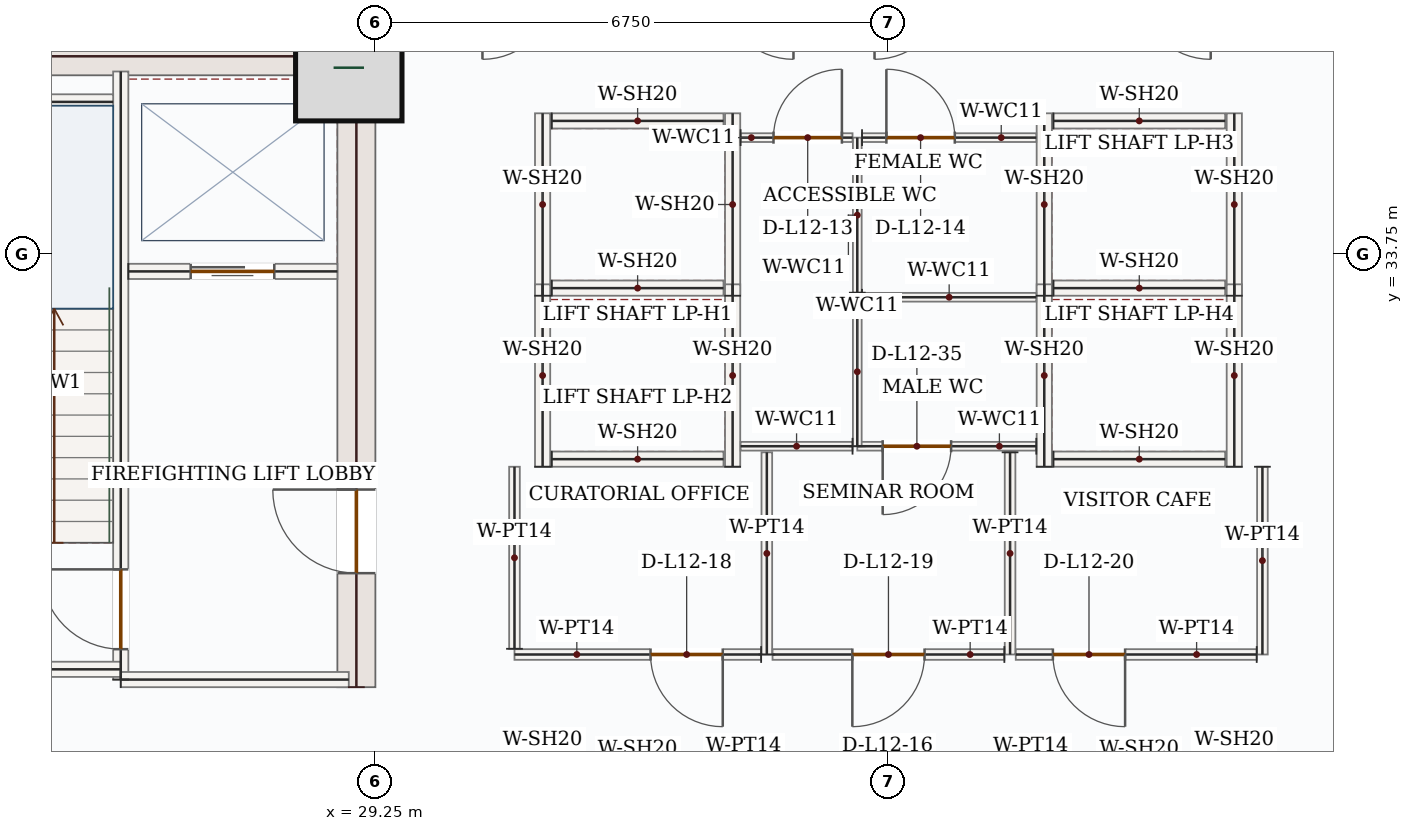
"""IFC4 building model, lengths in metres.
Left out: names, types, materials, properties, quantities, classifications, styles, units other than length and angle.
Written with IfcOpenShell. Run it as: python <this file> out.ifc"""

import sys

from ifc_helpers import new_model, si_unit, direction, frame, frame_2d, origin, origin_2d, place, context, subcontext, project, spatial, rectangle, extrude, source, transform, mapped, element, fill, save


model = new_model("IFC4")
c1 = context("Model", 3, precision=1e-05, world=origin(), true_north=direction((0.0, 1.0)))
c2 = subcontext(c1, "Body", "Model", "MODEL_VIEW")
j1 = project(units=[si_unit("LENGTHUNIT", "METRE"), si_unit("PLANEANGLEUNIT", "RADIAN")], contexts=[c1])
p1 = place(None, origin())
s1 = spatial("IfcSite", under=j1, at=p1, CompositionType="ELEMENT")
p2 = place(p1, origin())
s2 = spatial("IfcBuilding", under=s1, at=p2, CompositionType="ELEMENT")
p3 = place(p2, frame((0.0, 0.0, 58.5)))
s3 = spatial("IfcBuildingStorey", under=s2, at=p3, CompositionType="ELEMENT", Elevation=58.5)
p4 = place(p3, frame((29.0, 28.05, 0.0), z_axis=(0.0, 0.0, 1.0), x_axis=(0.0, 1.0, 0.0)))
e1 = element("IfcWall", 1, at=p4, inside=s3, PredefinedType="SHEAR", context=c2, shape_type="SweptSolid", body=[
    extrude(rectangle(XDim=8.55, YDim=0.5, at=frame_2d((4.275, 0.0))), origin(), (0.0, 0.0, 1.0), 3.95),
])
p5 = place(p4, frame((1.5, 0.0, 0.0)))
e2 = element("IfcOpeningElement", 2, at=p5, cuts=e1, PredefinedType="OPENING", context=c2, shape_type="SweptSolid", body=[
    extrude(rectangle(XDim=1.1, YDim=2.2, at=frame_2d((0.55, 1.1))), frame((0.0, 0.26, 0.0), z_axis=(0.0, -1.0, 0.0), x_axis=(1.0, 0.0, 0.0)), (0.0, 0.0, 1.0), 0.52),
])
m1 = source(origin(), c2, "Body", "SweptSolid", [
    extrude(rectangle(XDim=7.0, YDim=0.5, at=frame_2d((3.5, 0.0))), origin(), (0.0, 0.0, 1.0), 3.95),
])
p6 = place(p3, frame((21.75, 36.35, 0.0), z_axis=(0.0, 0.0, 1.0), x_axis=(1.0, 0.0, 0.0)))
e3 = element("IfcWall", 3, at=p6, inside=s3, PredefinedType="SHEAR", context=c2, shape_type="MappedRepresentation", body=[
    mapped(m1, transform((0.0, 0.0, 0.0), x_axis=(1.0, 0.0, 0.0), y_axis=(0.0, 1.0, 0.0), z_axis=(0.0, 0.0, 1.0), scale=1.0)),
])
m2 = source(origin(), c2, "Body", "SweptSolid", [
    extrude(rectangle(XDim=1.4, YDim=1.4, at=origin_2d()), origin(), (0.0, 0.0, 1.0), 4.2),
])
p7 = place(p3, frame((28.9, 36.2, 0.0), z_axis=(0.0, 0.0, 1.0), x_axis=(1.0, 0.0, 0.0)))
e4 = element("IfcColumn", 4, at=p7, inside=s3, PredefinedType="COLUMN", context=c2, shape_type="MappedRepresentation", body=[
    mapped(m2, transform((0.0, 0.0, 0.0), x_axis=(1.0, 0.0, 0.0), y_axis=(0.0, 1.0, 0.0), z_axis=(0.0, 0.0, 1.0), scale=1.0)),
])
p8 = place(p3, frame((25.9, 28.15, 0.0), z_axis=(0.0, 0.0, 1.0), x_axis=(0.0, 1.0, 0.0)))
e5 = element("IfcWall", 5, at=p8, inside=s3, PredefinedType="SOLIDWALL", context=c2, shape_type="SweptSolid", body=[
    extrude(rectangle(XDim=8.0, YDim=0.2, at=frame_2d((4.0, 0.0))), origin(), (0.0, 0.0, 1.0), 3.95),
])
p9 = place(p8, frame((0.4, 0.0, 0.0)))
e6 = element("IfcOpeningElement", 6, at=p9, cuts=e5, PredefinedType="OPENING", context=c2, shape_type="SweptSolid", body=[
    extrude(rectangle(XDim=1.05, YDim=2.15, at=frame_2d((0.525, 1.075))), frame((0.0, 0.11, 0.0), z_axis=(0.0, -1.0, 0.0), x_axis=(1.0, 0.0, 0.0)), (0.0, 0.0, 1.0), 0.22),
])
m3 = source(origin(), c2, "Body", "SweptSolid", [
    extrude(rectangle(XDim=4.25, YDim=0.2, at=frame_2d((2.125, 0.0))), origin(), (0.0, 0.0, 1.0), 3.95),
])
p10 = place(p3, frame((21.65, 28.285, 0.0), z_axis=(0.0, 0.0, 1.0), x_axis=(1.0, 0.0, 0.0)))
e7 = element("IfcWall", 7, at=p10, inside=s3, PredefinedType="SOLIDWALL", context=c2, shape_type="MappedRepresentation", body=[
    mapped(m3, transform((0.0, 0.0, 0.0), x_axis=(1.0, 0.0, 0.0), y_axis=(0.0, 1.0, 0.0), z_axis=(0.0, 0.0, 1.0), scale=1.0)),
])
m4 = source(origin(), c2, "Body", "SweptSolid", [
    extrude(rectangle(XDim=3.0, YDim=0.2, at=frame_2d((1.5, 0.0))), origin(), (0.0, 0.0, 1.0), 3.95),
])
p11 = place(p3, frame((25.9, 28.15, 0.0), z_axis=(0.0, 0.0, 1.0), x_axis=(1.0, 0.0, 0.0)))
e8 = element("IfcWall", 8, at=p11, inside=s3, PredefinedType="SOLIDWALL", context=c2, shape_type="MappedRepresentation", body=[
    mapped(m4, transform((0.0, 0.0, 0.0), x_axis=(1.0, 0.0, 0.0), y_axis=(0.0, 1.0, 0.0), z_axis=(0.0, 0.0, 1.0), scale=1.0)),
])
m5 = source(origin(), c2, "Body", "SweptSolid", [
    extrude(rectangle(XDim=3.25, YDim=0.2, at=frame_2d((1.625, 0.0))), origin(), (0.0, 0.0, 1.0), 3.95),
])
p12 = place(p3, frame((22.55, 35.75, 0.0), z_axis=(0.0, 0.0, 1.0), x_axis=(1.0, 0.0, 0.0)))
e9 = element("IfcWall", 9, at=p12, inside=s3, PredefinedType="SOLIDWALL", context=c2, shape_type="MappedRepresentation", body=[
    mapped(m5, transform((0.0, 0.0, 0.0), x_axis=(1.0, 0.0, 0.0), y_axis=(0.0, 1.0, 0.0), z_axis=(0.0, 0.0, 1.0), scale=1.0)),
])
p13 = place(p3, frame((26.0, 33.52, 0.0), z_axis=(0.0, 0.0, 1.0), x_axis=(1.0, 0.0, 0.0)))
e10 = element("IfcWall", 10, at=p13, inside=s3, PredefinedType="SOLIDWALL", context=c2, shape_type="SweptSolid", body=[
    extrude(rectangle(XDim=2.75, YDim=0.2, at=frame_2d((1.375, 0.0))), origin(), (0.0, 0.0, 1.0), 3.95),
])
p14 = place(p13, frame((0.82, 0.0, 0.0)))
e11 = element("IfcOpeningElement", 11, at=p14, cuts=e10, PredefinedType="OPENING", context=c2, shape_type="SweptSolid", body=[
    extrude(rectangle(XDim=1.1, YDim=2.15, at=frame_2d((0.55, 1.075))), frame((0.0, 0.11, 0.0), z_axis=(0.0, -1.0, 0.0), x_axis=(1.0, 0.0, 0.0)), (0.0, 0.0, 1.0), 0.22),
])
m6 = source(origin(), c2, "Body", "SweptSolid", [
    extrude(rectangle(XDim=2.4, YDim=0.2, at=frame_2d((1.2, 0.0))), origin(), (0.0, 0.0, 1.0), 3.95),
])
for number, where, z_axis, x_axis in (
    (12, (31.45, 33.2, 0.0), (0.0, 0.0, 1.0), (0.0, 1.0, 0.0)),
    (13, (33.95, 33.2, 0.0), (0.0, 0.0, 1.0), (0.0, 1.0, 0.0)),
):
    element("IfcWall", number, at=place(p3, frame(where, z_axis=z_axis, x_axis=x_axis)), inside=s3, PredefinedType="SOLIDWALL", context=c2, shape_type="MappedRepresentation", body=[
        mapped(m6, transform((0.0, 0.0, 0.0), x_axis=(1.0, 0.0, 0.0), y_axis=(0.0, 1.0, 0.0), z_axis=(0.0, 0.0, 1.0), scale=1.0)),
    ])
m7 = source(origin(), c2, "Body", "SweptSolid", [
    extrude(rectangle(XDim=2.26, YDim=0.2, at=frame_2d((1.13, 0.0))), origin(), (0.0, 0.0, 1.0), 3.95),
])
for number, where, z_axis, x_axis in (
    (14, (31.57, 33.3, 0.0), (0.0, 0.0, 1.0), (1.0, 0.0, 0.0)),
    (15, (31.57, 35.5, 0.0), (0.0, 0.0, 1.0), (1.0, 0.0, 0.0)),
):
    element("IfcWall", number, at=place(p3, frame(where, z_axis=z_axis, x_axis=x_axis)), inside=s3, PredefinedType="SOLIDWALL", context=c2, shape_type="MappedRepresentation", body=[
        mapped(m7, transform((0.0, 0.0, 0.0), x_axis=(1.0, 0.0, 0.0), y_axis=(0.0, 1.0, 0.0), z_axis=(0.0, 0.0, 1.0), scale=1.0)),
    ])
for number, where, z_axis, x_axis in (
    (16, (31.45, 30.95, 0.0), (0.0, 0.0, 1.0), (0.0, 1.0, 0.0)),
    (17, (33.95, 30.95, 0.0), (0.0, 0.0, 1.0), (0.0, 1.0, 0.0)),
):
    element("IfcWall", number, at=place(p3, frame(where, z_axis=z_axis, x_axis=x_axis)), inside=s3, PredefinedType="SOLIDWALL", context=c2, shape_type="MappedRepresentation", body=[
        mapped(m6, transform((0.0, 0.0, 0.0), x_axis=(1.0, 0.0, 0.0), y_axis=(0.0, 1.0, 0.0), z_axis=(0.0, 0.0, 1.0), scale=1.0)),
    ])
p15 = place(p3, frame((31.57, 31.05, 0.0), z_axis=(0.0, 0.0, 1.0), x_axis=(1.0, 0.0, 0.0)))
e18 = element("IfcWall", 18, at=p15, inside=s3, PredefinedType="SOLIDWALL", context=c2, shape_type="MappedRepresentation", body=[
    mapped(m7, transform((0.0, 0.0, 0.0), x_axis=(1.0, 0.0, 0.0), y_axis=(0.0, 1.0, 0.0), z_axis=(0.0, 0.0, 1.0), scale=1.0)),
])
for number, where, z_axis, x_axis in (
    (19, (38.05, 33.2, 0.0), (0.0, 0.0, 1.0), (0.0, 1.0, 0.0)),
    (20, (40.55, 33.2, 0.0), (0.0, 0.0, 1.0), (0.0, 1.0, 0.0)),
):
    element("IfcWall", number, at=place(p3, frame(where, z_axis=z_axis, x_axis=x_axis)), inside=s3, PredefinedType="SOLIDWALL", context=c2, shape_type="MappedRepresentation", body=[
        mapped(m6, transform((0.0, 0.0, 0.0), x_axis=(1.0, 0.0, 0.0), y_axis=(0.0, 1.0, 0.0), z_axis=(0.0, 0.0, 1.0), scale=1.0)),
    ])
for number, where, z_axis, x_axis in (
    (21, (38.17, 33.3, 0.0), (0.0, 0.0, 1.0), (1.0, 0.0, 0.0)),
    (22, (38.17, 35.5, 0.0), (0.0, 0.0, 1.0), (1.0, 0.0, 0.0)),
):
    element("IfcWall", number, at=place(p3, frame(where, z_axis=z_axis, x_axis=x_axis)), inside=s3, PredefinedType="SOLIDWALL", context=c2, shape_type="MappedRepresentation", body=[
        mapped(m7, transform((0.0, 0.0, 0.0), x_axis=(1.0, 0.0, 0.0), y_axis=(0.0, 1.0, 0.0), z_axis=(0.0, 0.0, 1.0), scale=1.0)),
    ])
for number, where, z_axis, x_axis in (
    (23, (38.05, 30.95, 0.0), (0.0, 0.0, 1.0), (0.0, 1.0, 0.0)),
    (24, (40.55, 30.95, 0.0), (0.0, 0.0, 1.0), (0.0, 1.0, 0.0)),
):
    element("IfcWall", number, at=place(p3, frame(where, z_axis=z_axis, x_axis=x_axis)), inside=s3, PredefinedType="SOLIDWALL", context=c2, shape_type="MappedRepresentation", body=[
        mapped(m6, transform((0.0, 0.0, 0.0), x_axis=(1.0, 0.0, 0.0), y_axis=(0.0, 1.0, 0.0), z_axis=(0.0, 0.0, 1.0), scale=1.0)),
    ])
p16 = place(p3, frame((38.17, 31.05, 0.0), z_axis=(0.0, 0.0, 1.0), x_axis=(1.0, 0.0, 0.0)))
e25 = element("IfcWall", 25, at=p16, inside=s3, PredefinedType="SOLIDWALL", context=c2, shape_type="MappedRepresentation", body=[
    mapped(m7, transform((0.0, 0.0, 0.0), x_axis=(1.0, 0.0, 0.0), y_axis=(0.0, 1.0, 0.0), z_axis=(0.0, 0.0, 1.0), scale=1.0)),
])
p17 = place(p3, frame((37.945, 31.22, 0.0), z_axis=(0.0, 0.0, 1.0), x_axis=(-1.0, 0.0, 0.0)))
e26 = element("IfcWall", 26, at=p17, inside=s3, PredefinedType="PARTITIONING", context=c2, shape_type="SweptSolid", body=[
    extrude(rectangle(XDim=2.355, YDim=0.115, at=frame_2d((1.177, 0.0))), origin(), (0.0, 0.0, 1.0), 3.95),
])
p18 = place(p17, frame((1.121, 0.0, 0.0)))
e27 = element("IfcOpeningElement", 27, at=p18, cuts=e26, PredefinedType="OPENING", context=c2, shape_type="SweptSolid", body=[
    extrude(rectangle(XDim=0.9, YDim=2.1, at=frame_2d((0.45, 1.05))), frame((0.0, 0.067, 0.0), z_axis=(0.0, -1.0, 0.0), x_axis=(1.0, 0.0, 0.0)), (0.0, 0.0, 1.0), 0.135),
])
m8 = source(origin(), c2, "Body", "SweptSolid", [
    extrude(rectangle(XDim=1.96, YDim=0.115, at=frame_2d((0.98, 0.0))), origin(), (0.0, 0.0, 1.0), 3.95),
])
p19 = place(p3, frame((35.59, 31.22, 0.0), z_axis=(0.0, 0.0, 1.0), x_axis=(0.0, 1.0, 0.0)))
e28 = element("IfcWall", 28, at=p19, inside=s3, PredefinedType="PARTITIONING", context=c2, shape_type="MappedRepresentation", body=[
    mapped(m8, transform((0.0, 0.0, 0.0), x_axis=(1.0, 0.0, 0.0), y_axis=(0.0, 1.0, 0.0), z_axis=(0.0, 0.0, 1.0), scale=1.0)),
])
m9 = source(origin(), c2, "Body", "SweptSolid", [
    extrude(rectangle(XDim=2.292, YDim=0.115, at=frame_2d((1.146, 0.0))), origin(), (0.0, 0.0, 1.0), 3.95),
])
p20 = place(p3, frame((35.653, 33.18, 0.0), z_axis=(0.0, 0.0, 1.0), x_axis=(1.0, 0.0, 0.0)))
e29 = element("IfcWall", 29, at=p20, inside=s3, PredefinedType="PARTITIONING", context=c2, shape_type="MappedRepresentation", body=[
    mapped(m9, transform((0.0, 0.0, 0.0), x_axis=(1.0, 0.0, 0.0), y_axis=(0.0, 1.0, 0.0), z_axis=(0.0, 0.0, 1.0), scale=1.0)),
])
m10 = source(origin(), c2, "Body", "SweptSolid", [
    extrude(rectangle(XDim=2.04, YDim=0.115, at=frame_2d((1.02, 0.0))), origin(), (0.0, 0.0, 1.0), 3.95),
])
p21 = place(p3, frame((35.59, 33.24, 0.0), z_axis=(0.0, 0.0, 1.0), x_axis=(0.0, 1.0, 0.0)))
e30 = element("IfcWall", 30, at=p21, inside=s3, PredefinedType="PARTITIONING", context=c2, shape_type="MappedRepresentation", body=[
    mapped(m10, transform((0.0, 0.0, 0.0), x_axis=(1.0, 0.0, 0.0), y_axis=(0.0, 1.0, 0.0), z_axis=(0.0, 0.0, 1.0), scale=1.0)),
])
p22 = place(p3, frame((35.653, 35.28, 0.0), z_axis=(0.0, 0.0, 1.0), x_axis=(1.0, 0.0, 0.0)))
e31 = element("IfcWall", 31, at=p22, inside=s3, PredefinedType="PARTITIONING", context=c2, shape_type="SweptSolid", body=[
    extrude(rectangle(XDim=2.292, YDim=0.115, at=frame_2d((1.146, 0.0))), origin(), (0.0, 0.0, 1.0), 3.95),
])
p23 = place(p22, frame((0.32, 0.0, 0.0)))
e32 = element("IfcOpeningElement", 32, at=p23, cuts=e31, PredefinedType="OPENING", context=c2, shape_type="SweptSolid", body=[
    extrude(rectangle(XDim=0.9, YDim=2.1, at=frame_2d((0.45, 1.05))), frame((0.0, 0.067, 0.0), z_axis=(0.0, -1.0, 0.0), x_axis=(1.0, 0.0, 0.0)), (0.0, 0.0, 1.0), 0.135),
])
m11 = source(origin(), c2, "Body", "SweptSolid", [
    extrude(rectangle(XDim=1.473, YDim=0.115, at=frame_2d((0.736, 0.0))), origin(), (0.0, 0.0, 1.0), 3.95),
])
p24 = place(p3, frame((35.528, 31.22, 0.0), z_axis=(0.0, 0.0, 1.0), x_axis=(-1.0, 0.0, 0.0)))
e33 = element("IfcWall", 33, at=p24, inside=s3, PredefinedType="PARTITIONING", context=c2, shape_type="MappedRepresentation", body=[
    mapped(m11, transform((0.0, 0.0, 0.0), x_axis=(1.0, 0.0, 0.0), y_axis=(0.0, 1.0, 0.0), z_axis=(0.0, 0.0, 1.0), scale=1.0)),
])
p25 = place(p3, frame((34.055, 35.28, 0.0), z_axis=(0.0, 0.0, 1.0), x_axis=(1.0, 0.0, 0.0)))
e34 = element("IfcWall", 34, at=p25, inside=s3, PredefinedType="PARTITIONING", context=c2, shape_type="SweptSolid", body=[
    extrude(rectangle(XDim=1.473, YDim=0.115, at=frame_2d((0.736, 0.0))), origin(), (0.0, 0.0, 1.0), 3.95),
])
p26 = place(p25, frame((0.433, 0.0, 0.0)))
e35 = element("IfcOpeningElement", 35, at=p26, cuts=e34, PredefinedType="OPENING", context=c2, shape_type="SweptSolid", body=[
    extrude(rectangle(XDim=0.9, YDim=2.1, at=frame_2d((0.45, 1.05))), frame((0.0, 0.067, 0.0), z_axis=(0.0, -1.0, 0.0), x_axis=(1.0, 0.0, 0.0)), (0.0, 0.0, 1.0), 0.135),
])
m12 = source(origin(), c2, "Body", "SweptSolid", [
    extrude(rectangle(XDim=2.66, YDim=0.14, at=frame_2d((1.33, 0.0))), origin(), (0.0, 0.0, 1.0), 3.95),
])
for number, where, z_axis, x_axis in (
    (36, (34.4, 28.48, 0.0), (0.0, 0.0, 1.0), (0.0, 1.0, 0.0)),
    (37, (37.6, 31.14, 0.0), (0.0, 0.0, 1.0), (0.0, -1.0, 0.0)),
):
    element("IfcWall", number, at=place(p3, frame(where, z_axis=z_axis, x_axis=x_axis)), inside=s3, PredefinedType="PARTITIONING", context=c2, shape_type="MappedRepresentation", body=[
        mapped(m12, transform((0.0, 0.0, 0.0), x_axis=(1.0, 0.0, 0.0), y_axis=(0.0, 1.0, 0.0), z_axis=(0.0, 0.0, 1.0), scale=1.0)),
    ])
p27 = place(p3, frame((37.525, 28.48, 0.0), z_axis=(0.0, 0.0, 1.0), x_axis=(-1.0, 0.0, 0.0)))
e38 = element("IfcWall", 38, at=p27, inside=s3, PredefinedType="PARTITIONING", context=c2, shape_type="SweptSolid", body=[
    extrude(rectangle(XDim=3.05, YDim=0.14, at=frame_2d((1.525, 0.0))), origin(), (0.0, 0.0, 1.0), 3.95),
])
p28 = place(p27, frame((1.05, 0.0, 0.0)))
e39 = element("IfcOpeningElement", 39, at=p28, cuts=e38, PredefinedType="OPENING", context=c2, shape_type="SweptSolid", body=[
    extrude(rectangle(XDim=0.95, YDim=2.15, at=frame_2d((0.475, 1.075))), frame((0.0, 0.08, 0.0), z_axis=(0.0, -1.0, 0.0), x_axis=(1.0, 0.0, 0.0)), (0.0, 0.0, 1.0), 0.16),
])
p29 = place(p3, frame((34.325, 28.48, 0.0), z_axis=(0.0, 0.0, 1.0), x_axis=(-1.0, 0.0, 0.0)))
e40 = element("IfcWall", 40, at=p29, inside=s3, PredefinedType="PARTITIONING", context=c2, shape_type="SweptSolid", body=[
    extrude(rectangle(XDim=3.245, YDim=0.14, at=frame_2d((1.623, 0.0))), origin(), (0.0, 0.0, 1.0), 3.95),
])
p30 = place(p29, frame((0.505, 0.0, 0.0)))
e41 = element("IfcOpeningElement", 41, at=p30, cuts=e40, PredefinedType="OPENING", context=c2, shape_type="SweptSolid", body=[
    extrude(rectangle(XDim=0.95, YDim=2.15, at=frame_2d((0.475, 1.075))), frame((0.0, 0.08, 0.0), z_axis=(0.0, -1.0, 0.0), x_axis=(1.0, 0.0, 0.0)), (0.0, 0.0, 1.0), 0.16),
])
m13 = source(origin(), c2, "Body", "SweptSolid", [
    extrude(rectangle(XDim=2.395, YDim=0.14, at=frame_2d((1.198, 0.0))), origin(), (0.0, 0.0, 1.0), 3.95),
])
p31 = place(p3, frame((31.08, 28.555, 0.0), z_axis=(0.0, 0.0, 1.0), x_axis=(0.0, 1.0, 0.0)))
e42 = element("IfcWall", 42, at=p31, inside=s3, PredefinedType="PARTITIONING", context=c2, shape_type="MappedRepresentation", body=[
    mapped(m13, transform((0.0, 0.0, 0.0), x_axis=(1.0, 0.0, 0.0), y_axis=(0.0, 1.0, 0.0), z_axis=(0.0, 0.0, 1.0), scale=1.0)),
])
m14 = source(origin(), c2, "Body", "SweptSolid", [
    extrude(rectangle(XDim=2.47, YDim=0.14, at=frame_2d((1.235, 0.0))), origin(), (0.0, 0.0, 1.0), 3.95),
])
p32 = place(p3, frame((40.92, 30.95, 0.0), z_axis=(0.0, 0.0, 1.0), x_axis=(0.0, -1.0, 0.0)))
e43 = element("IfcWall", 43, at=p32, inside=s3, PredefinedType="PARTITIONING", context=c2, shape_type="MappedRepresentation", body=[
    mapped(m14, transform((0.0, 0.0, 0.0), x_axis=(1.0, 0.0, 0.0), y_axis=(0.0, 1.0, 0.0), z_axis=(0.0, 0.0, 1.0), scale=1.0)),
])
p33 = place(p3, frame((40.845, 28.48, 0.0), z_axis=(0.0, 0.0, 1.0), x_axis=(-1.0, 0.0, 0.0)))
e44 = element("IfcWall", 44, at=p33, inside=s3, PredefinedType="PARTITIONING", context=c2, shape_type="SweptSolid", body=[
    extrude(rectangle(XDim=3.17, YDim=0.14, at=frame_2d((1.585, 0.0))), origin(), (0.0, 0.0, 1.0), 3.95),
])
p34 = place(p33, frame((1.732, 0.0, 0.0)))
e45 = element("IfcOpeningElement", 45, at=p34, cuts=e44, PredefinedType="OPENING", context=c2, shape_type="SweptSolid", body=[
    extrude(rectangle(XDim=0.95, YDim=2.15, at=frame_2d((0.475, 1.075))), frame((0.0, 0.08, 0.0), z_axis=(0.0, -1.0, 0.0), x_axis=(1.0, 0.0, 0.0)), (0.0, 0.0, 1.0), 0.16),
])
m15 = source(origin(), c2, "Body", "SweptSolid", [
    extrude(rectangle(XDim=1.05, YDim=2.15, at=frame_2d((0.525, 1.075))), frame((0.0, 0.025, 0.0), z_axis=(0.0, -1.0, 0.0), x_axis=(1.0, 0.0, 0.0)), (0.0, 0.0, 1.0), 0.05),
])
p35 = place(p9, origin())
e46 = element("IfcDoor", 46, at=p35, inside=s3, OperationType="SINGLE_SWING_RIGHT", PredefinedType="DOOR", context=c2, shape_type="MappedRepresentation", body=[
    mapped(m15, transform((0.0, 0.0, 0.0), x_axis=(1.0, 0.0, 0.0), y_axis=(0.0, 1.0, 0.0), z_axis=(0.0, 0.0, 1.0), scale=1.0)),
])
fill(e6, e46)
m16 = source(origin(), c2, "Body", "SweptSolid", [
    extrude(rectangle(XDim=1.1, YDim=2.15, at=frame_2d((0.55, 1.075))), frame((0.0, 0.025, 0.0), z_axis=(0.0, -1.0, 0.0), x_axis=(1.0, 0.0, 0.0)), (0.0, 0.0, 1.0), 0.05),
])
p36 = place(p14, origin())
e47 = element("IfcDoor", 47, at=p36, inside=s3, OperationType="DOUBLE_DOOR_SLIDING", PredefinedType="DOOR", context=c2, shape_type="MappedRepresentation", body=[
    mapped(m16, transform((0.0, 0.0, 0.0), x_axis=(1.0, 0.0, 0.0), y_axis=(0.0, 1.0, 0.0), z_axis=(0.0, 0.0, 1.0), scale=1.0)),
])
fill(e11, e47)
m17 = source(origin(), c2, "Body", "SweptSolid", [
    extrude(rectangle(XDim=1.1, YDim=2.2, at=frame_2d((0.55, 1.1))), frame((0.0, 0.025, 0.0), z_axis=(0.0, -1.0, 0.0), x_axis=(1.0, 0.0, 0.0)), (0.0, 0.0, 1.0), 0.05),
])
p37 = place(p5, origin())
e48 = element("IfcDoor", 48, at=p37, inside=s3, OperationType="SINGLE_SWING_RIGHT", PredefinedType="DOOR", context=c2, shape_type="MappedRepresentation", body=[
    mapped(m17, transform((0.0, 0.0, 0.0), x_axis=(1.0, 0.0, 0.0), y_axis=(0.0, 1.0, 0.0), z_axis=(0.0, 0.0, 1.0), scale=1.0)),
])
fill(e2, e48)
m18 = source(origin(), c2, "Body", "SweptSolid", [
    extrude(rectangle(XDim=0.9, YDim=2.1, at=frame_2d((0.45, 1.05))), frame((0.0, 0.025, 0.0), z_axis=(0.0, -1.0, 0.0), x_axis=(1.0, 0.0, 0.0)), (0.0, 0.0, 1.0), 0.05),
])
p38 = place(p26, origin())
e49 = element("IfcDoor", 49, at=p38, inside=s3, OperationType="SINGLE_SWING_RIGHT", PredefinedType="DOOR", context=c2, shape_type="MappedRepresentation", body=[
    mapped(m18, transform((0.0, 0.0, 0.0), x_axis=(1.0, 0.0, 0.0), y_axis=(0.0, 1.0, 0.0), z_axis=(0.0, 0.0, 1.0), scale=1.0)),
])
fill(e35, e49)
p39 = place(p23, origin())
e50 = element("IfcDoor", 50, at=p39, inside=s3, OperationType="SINGLE_SWING_LEFT", PredefinedType="DOOR", context=c2, shape_type="MappedRepresentation", body=[
    mapped(m18, transform((0.0, 0.0, 0.0), x_axis=(1.0, 0.0, 0.0), y_axis=(0.0, 1.0, 0.0), z_axis=(0.0, 0.0, 1.0), scale=1.0)),
])
fill(e32, e50)
m19 = source(origin(), c2, "Body", "SweptSolid", [
    extrude(rectangle(XDim=0.95, YDim=2.15, at=frame_2d((0.475, 1.075))), frame((0.0, 0.025, 0.0), z_axis=(0.0, -1.0, 0.0), x_axis=(1.0, 0.0, 0.0)), (0.0, 0.0, 1.0), 0.05),
])
p40 = place(p30, origin())
e51 = element("IfcDoor", 51, at=p40, inside=s3, OperationType="SINGLE_SWING_LEFT", PredefinedType="DOOR", context=c2, shape_type="MappedRepresentation", body=[
    mapped(m19, transform((0.0, 0.0, 0.0), x_axis=(1.0, 0.0, 0.0), y_axis=(0.0, 1.0, 0.0), z_axis=(0.0, 0.0, 1.0), scale=1.0)),
])
fill(e41, e51)
p41 = place(p28, origin())
e52 = element("IfcDoor", 52, at=p41, inside=s3, OperationType="SINGLE_SWING_RIGHT", PredefinedType="DOOR", context=c2, shape_type="MappedRepresentation", body=[
    mapped(m19, transform((0.0, 0.0, 0.0), x_axis=(1.0, 0.0, 0.0), y_axis=(0.0, 1.0, 0.0), z_axis=(0.0, 0.0, 1.0), scale=1.0)),
])
fill(e39, e52)
p42 = place(p34, origin())
e53 = element("IfcDoor", 53, at=p42, inside=s3, OperationType="SINGLE_SWING_LEFT", PredefinedType="DOOR", context=c2, shape_type="MappedRepresentation", body=[
    mapped(m19, transform((0.0, 0.0, 0.0), x_axis=(1.0, 0.0, 0.0), y_axis=(0.0, 1.0, 0.0), z_axis=(0.0, 0.0, 1.0), scale=1.0)),
])
fill(e45, e53)
p43 = place(p18, origin())
e54 = element("IfcDoor", 54, at=p43, inside=s3, OperationType="SINGLE_SWING_RIGHT", PredefinedType="DOOR", context=c2, shape_type="MappedRepresentation", body=[
    mapped(m18, transform((0.0, 0.0, 0.0), x_axis=(1.0, 0.0, 0.0), y_axis=(0.0, 1.0, 0.0), z_axis=(0.0, 0.0, 1.0), scale=1.0)),
])
fill(e27, e54)
save(model, sys.argv[1])
